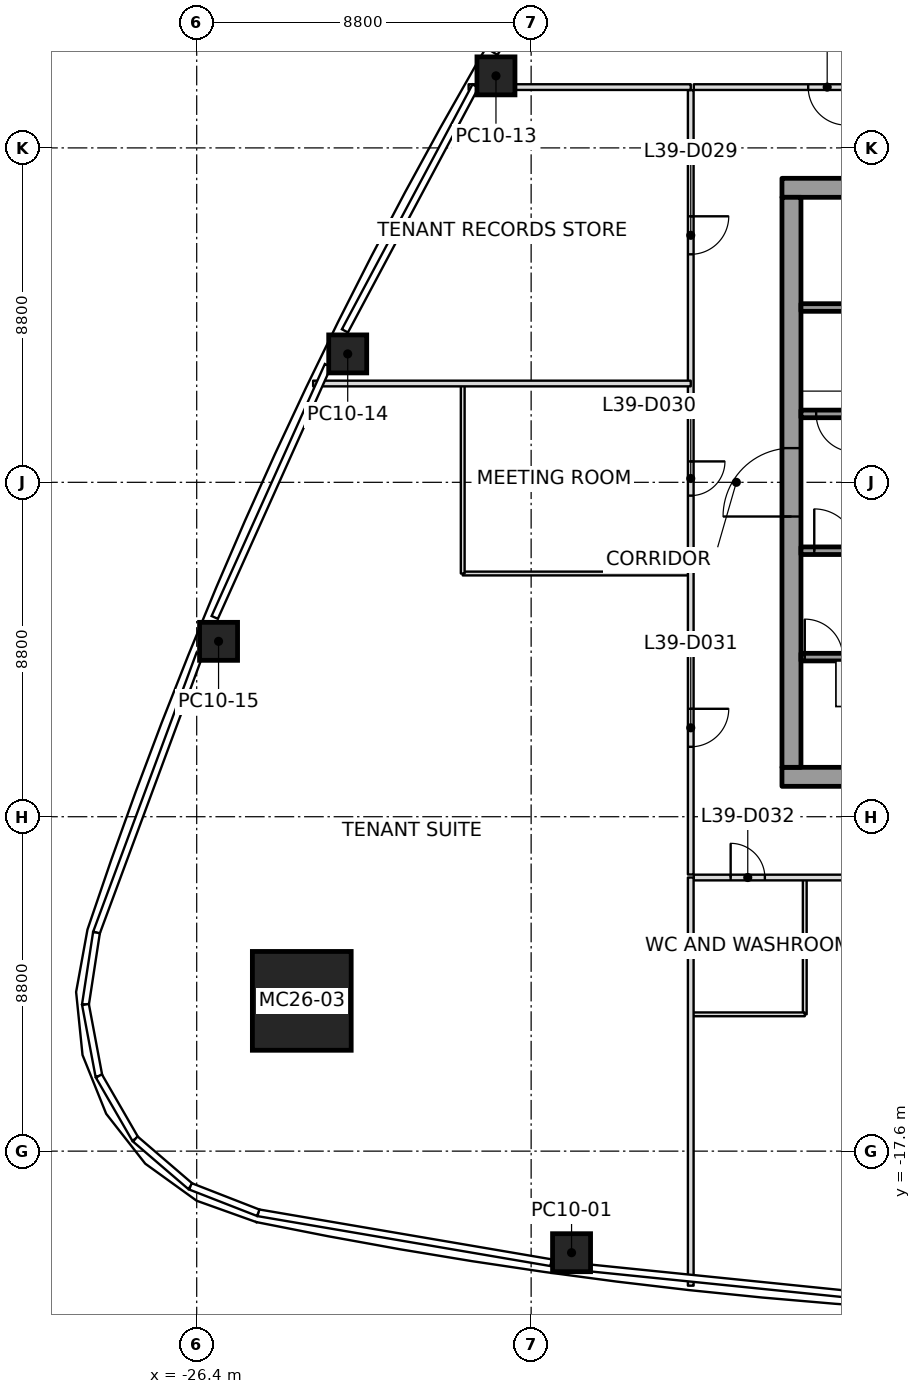
"""IFC4 building model, lengths in metres.
Left out: names, types, materials, properties, quantities, classifications, styles, units other than length and angle.
Written with IfcOpenShell. Run it as: python <this file> out.ifc"""

import sys

from ifc_helpers import new_model, si_unit, direction, frame, frame_2d, origin, origin_2d, place, context, subcontext, project, spatial, rectangle, extrude, element, fill, save


model = new_model("IFC4")
c1 = context("Model", 3, precision=1e-05, world=origin(), true_north=direction((0.0, 1.0)))
c2 = subcontext(c1, "Body", "Model", "MODEL_VIEW")
j1 = project(units=[si_unit("LENGTHUNIT", "METRE"), si_unit("PLANEANGLEUNIT", "RADIAN")], contexts=[c1])
p1 = place(None, origin())
s1 = spatial("IfcSite", under=j1, at=p1, CompositionType="ELEMENT")
p2 = place(p1, origin())
s2 = spatial("IfcBuilding", under=s1, at=p2, CompositionType="ELEMENT")
p3 = place(p2, frame((0.0, 0.0, 177.8)))
s3 = spatial("IfcBuildingStorey", under=s2, at=p3, CompositionType="ELEMENT", Elevation=177.8)
p4 = place(p3, frame((-23.635, -13.646, 0.0), z_axis=(0.028000489904, 0.016165860184, 0.999477182096), x_axis=(0.999607909415, -0.000452829555, -0.027996828039)))
e1 = element("IfcColumn", 1, at=p4, inside=s3, PredefinedType="COLUMN", context=c2, shape_type="SweptSolid", body=[
    extrude(rectangle(XDim=2.6, YDim=2.6, at=origin_2d()), origin(), (0.0, 0.0, 1.0), 4.002),
])
p5 = place(p3, frame((-16.536, -20.273, 0.0), z_axis=(0.017635456472, 0.010434820265, 0.999790030557), x_axis=(-0.990735318315, 0.134853029404, 0.016068276304)))
e2 = element("IfcColumn", 2, at=p5, inside=s3, PredefinedType="COLUMN", context=c2, shape_type="SweptSolid", body=[
    extrude(rectangle(XDim=1.0, YDim=1.0, at=origin_2d()), origin(), (0.0, 0.0, 1.0), 4.001),
])
p6 = place(p3, frame((-18.525, 10.696, 0.0), z_axis=(0.009887049298, -0.00573692984, 0.999934664812), x_axis=(0.499975560967, 0.866039512843, 2.5126546e-05)))
e3 = element("IfcColumn", 3, at=p6, inside=s3, PredefinedType="COLUMN", context=c2, shape_type="SweptSolid", body=[
    extrude(rectangle(XDim=1.0, YDim=1.0, at=origin_2d()), origin(), (0.0, 0.0, 1.0), 4.0),
])
p7 = place(p3, frame((-22.427, 3.379, 0.0), z_axis=(0.014097689605, 0.002074984617, 0.999898469639), x_axis=(0.440365548951, 0.897782283565, -0.008071840787)))
e4 = element("IfcColumn", 4, at=p7, inside=s3, PredefinedType="COLUMN", context=c2, shape_type="SweptSolid", body=[
    extrude(rectangle(XDim=1.0, YDim=1.0, at=origin_2d()), origin(), (0.0, 0.0, 1.0), 4.0),
])
p8 = place(p3, frame((-25.825, -4.185, 0.0), z_axis=(0.017879535448, 0.010068680372, 0.999789449778), x_axis=(0.378749595441, 0.925359269991, -0.016092401795)))
e5 = element("IfcColumn", 5, at=p8, inside=s3, PredefinedType="COLUMN", context=c2, shape_type="SweptSolid", body=[
    extrude(rectangle(XDim=1.0, YDim=1.0, at=origin_2d()), origin(), (0.0, 0.0, 1.0), 4.001),
])
p9 = place(p3, frame((-11.0, -7.75, 0.0), z_axis=(0.0, 0.0, 1.0), x_axis=(1.0, 0.0, 0.0)))
e6 = element("IfcWall", 6, at=p9, inside=s3, PredefinedType="SHEAR", context=c2, shape_type="SweptSolid", body=[
    extrude(rectangle(XDim=22.0, YDim=0.5, at=frame_2d((11.0, 0.0))), origin(), (0.0, 0.0, 1.0), 4.0),
])
p10 = place(p9, frame((10.45, 0.0, 0.0)))
e7 = element("IfcOpeningElement", 7, at=p10, cuts=e6, PredefinedType="OPENING", context=c2, shape_type="SweptSolid", body=[
    extrude(rectangle(XDim=1.1, YDim=2.1, at=frame_2d((0.55, 1.05))), frame((0.0, 0.25, 0.0), z_axis=(0.0, -1.0, 0.0), x_axis=(1.0, 0.0, 0.0)), (0.0, 0.0, 1.0), 0.5),
])
p11 = place(p3, frame((-11.0, 7.75, 0.0), z_axis=(0.0, 0.0, 1.0), x_axis=(1.0, 0.0, 0.0)))
e8 = element("IfcWall", 8, at=p11, inside=s3, PredefinedType="SHEAR", context=c2, shape_type="SweptSolid", body=[
    extrude(rectangle(XDim=22.0, YDim=0.5, at=frame_2d((11.0, 0.0))), origin(), (0.0, 0.0, 1.0), 4.0),
])
p12 = place(p11, frame((10.45, 0.0, 0.0)))
e9 = element("IfcOpeningElement", 9, at=p12, cuts=e8, PredefinedType="OPENING", context=c2, shape_type="SweptSolid", body=[
    extrude(rectangle(XDim=1.1, YDim=2.1, at=frame_2d((0.55, 1.05))), frame((0.0, 0.25, 0.0), z_axis=(0.0, -1.0, 0.0), x_axis=(1.0, 0.0, 0.0)), (0.0, 0.0, 1.0), 0.5),
])
p13 = place(p3, frame((-10.75, -7.5, 0.0), z_axis=(0.0, 0.0, 1.0), x_axis=(0.0, 1.0, 0.0)))
e10 = element("IfcWall", 10, at=p13, inside=s3, PredefinedType="SHEAR", context=c2, shape_type="SweptSolid", body=[
    extrude(rectangle(XDim=15.0, YDim=0.5, at=frame_2d((7.5, 0.0))), origin(), (0.0, 0.0, 1.0), 4.0),
])
p14 = place(p13, frame((6.6, 0.0, 0.0)))
e11 = element("IfcOpeningElement", 11, at=p14, cuts=e10, PredefinedType="OPENING", context=c2, shape_type="SweptSolid", body=[
    extrude(rectangle(XDim=1.8, YDim=2.1, at=frame_2d((0.9, 1.05))), frame((0.0, 0.25, 0.0), z_axis=(0.0, -1.0, 0.0), x_axis=(1.0, 0.0, 0.0)), (0.0, 0.0, 1.0), 0.5),
])
p15 = place(p3, frame((-10.5, -4.6, 0.0), z_axis=(0.0, 0.0, 1.0), x_axis=(1.0, 0.0, 0.0)))
e12 = element("IfcWall", 12, at=p15, inside=s3, PredefinedType="SOLIDWALL", context=c2, shape_type="SweptSolid", body=[
    extrude(rectangle(XDim=1.8, YDim=0.2, at=frame_2d((0.9, 0.0))), origin(), (0.0, 0.0, 1.0), 3.85),
])
p16 = place(p15, frame((0.1, 0.0, 0.0)))
e13 = element("IfcOpeningElement", 13, at=p16, cuts=e12, PredefinedType="OPENING", context=c2, shape_type="SweptSolid", body=[
    extrude(rectangle(XDim=1.0, YDim=2.1, at=frame_2d((0.5, 1.05))), frame((0.0, 0.1, 0.0), z_axis=(0.0, -1.0, 0.0), x_axis=(1.0, 0.0, 0.0)), (0.0, 0.0, 1.0), 0.2),
])
p17 = place(p3, frame((-10.5, -1.8, 0.0), z_axis=(0.0, 0.0, 1.0), x_axis=(1.0, 0.0, 0.0)))
e14 = element("IfcWall", 14, at=p17, inside=s3, PredefinedType="SOLIDWALL", context=c2, shape_type="SweptSolid", body=[
    extrude(rectangle(XDim=1.8, YDim=0.2, at=frame_2d((0.9, 0.0))), origin(), (0.0, 0.0, 1.0), 3.85),
])
p18 = place(p17, frame((0.35, 0.0, 0.0)))
e15 = element("IfcOpeningElement", 15, at=p18, cuts=e14, PredefinedType="OPENING", context=c2, shape_type="SweptSolid", body=[
    extrude(rectangle(XDim=1.1, YDim=2.1, at=frame_2d((0.55, 1.05))), frame((0.0, 0.1, 0.0), z_axis=(0.0, -1.0, 0.0), x_axis=(1.0, 0.0, 0.0)), (0.0, 0.0, 1.0), 0.2),
])
p19 = place(p3, frame((-8.7, 1.8, 0.0), z_axis=(0.0, 0.0, 1.0), x_axis=(-1.0, 0.0, 0.0)))
e16 = element("IfcWall", 16, at=p19, inside=s3, PredefinedType="SOLIDWALL", context=c2, shape_type="SweptSolid", body=[
    extrude(rectangle(XDim=1.8, YDim=0.2, at=frame_2d((0.9, 0.0))), origin(), (0.0, 0.0, 1.0), 3.85),
])
p20 = place(p19, frame((0.4, 0.0, 0.0)))
e17 = element("IfcOpeningElement", 17, at=p20, cuts=e16, PredefinedType="OPENING", context=c2, shape_type="SweptSolid", body=[
    extrude(rectangle(XDim=1.0, YDim=2.1, at=frame_2d((0.5, 1.05))), frame((0.0, 0.1, 0.0), z_axis=(0.0, -1.0, 0.0), x_axis=(1.0, 0.0, 0.0)), (0.0, 0.0, 1.0), 0.2),
])
p21 = place(p3, frame((-8.7, 4.6, 0.0), z_axis=(0.0, 0.0, 1.0), x_axis=(-1.0, 0.0, 0.0)))
e18 = element("IfcWall", 18, at=p21, inside=s3, PredefinedType="SOLIDWALL", context=c2, shape_type="SweptSolid", body=[
    extrude(rectangle(XDim=1.8, YDim=0.2, at=frame_2d((0.9, 0.0))), origin(), (0.0, 0.0, 1.0), 3.85),
])
p22 = place(p3, frame((-13.4, 2.6, 0.0), z_axis=(0.0, 0.0, 1.0), x_axis=(-1.0, 0.0, 0.0)))
e19 = element("IfcWall", 19, at=p22, inside=s3, PredefinedType="PARTITIONING", context=c2, shape_type="SweptSolid", body=[
    extrude(rectangle(XDim=9.937, YDim=0.15, at=frame_2d((4.968, 0.0))), origin(), (0.0, 0.0, 1.0), 3.234),
])
p23 = place(p3, frame((-13.4, 10.4, 0.0), z_axis=(0.0, 0.0, 1.0), x_axis=(-1.0, 0.0, 0.0)))
e20 = element("IfcWall", 20, at=p23, inside=s3, PredefinedType="PARTITIONING", context=c2, shape_type="SweptSolid", body=[
    extrude(rectangle(XDim=5.845, YDim=0.15, at=frame_2d((2.923, 0.0))), origin(), (0.0, 0.0, 1.0), 3.234),
])
p24 = place(p3, frame((-13.4, -10.4, 0.0), z_axis=(0.0, 0.0, 1.0), x_axis=(0.0, -1.0, 0.0)))
e21 = element("IfcWall", 21, at=p24, inside=s3, PredefinedType="PARTITIONING", context=c2, shape_type="SweptSolid", body=[
    extrude(rectangle(XDim=10.741, YDim=0.15, at=frame_2d((5.37, 0.0))), origin(), (0.0, 0.0, 1.0), 3.234),
])
p25 = place(p3, frame((-13.4, 10.32, 0.0), z_axis=(0.0, 0.0, 1.0), x_axis=(0.0, -1.0, 0.0)))
e22 = element("IfcWall", 22, at=p25, inside=s3, PredefinedType="PARTITIONING", context=c2, shape_type="SweptSolid", body=[
    extrude(rectangle(XDim=20.64, YDim=0.15, at=frame_2d((10.32, 0.0))), origin(), (0.0, 0.0, 1.0), 3.166),
])
p26 = place(p25, frame((3.32, 0.0, 0.0)))
e23 = element("IfcOpeningElement", 23, at=p26, cuts=e22, PredefinedType="OPENING", context=c2, shape_type="SweptSolid", body=[
    extrude(rectangle(XDim=1.0, YDim=2.1, at=frame_2d((0.5, 1.05))), frame((0.0, 0.075, 0.0), z_axis=(0.0, -1.0, 0.0), x_axis=(1.0, 0.0, 0.0)), (0.0, 0.0, 1.0), 0.15),
])
p27 = place(p25, frame((9.77, 0.0, 0.0)))
e24 = element("IfcOpeningElement", 24, at=p27, cuts=e22, PredefinedType="OPENING", context=c2, shape_type="SweptSolid", body=[
    extrude(rectangle(XDim=0.9, YDim=2.1, at=frame_2d((0.45, 1.05))), frame((0.0, 0.075, 0.0), z_axis=(0.0, -1.0, 0.0), x_axis=(1.0, 0.0, 0.0)), (0.0, 0.0, 1.0), 0.15),
])
p28 = place(p25, frame((16.28, 0.0, 0.0)))
e25 = element("IfcOpeningElement", 25, at=p28, cuts=e22, PredefinedType="OPENING", context=c2, shape_type="SweptSolid", body=[
    extrude(rectangle(XDim=1.0, YDim=2.1, at=frame_2d((0.5, 1.05))), frame((0.0, 0.075, 0.0), z_axis=(0.0, -1.0, 0.0), x_axis=(1.0, 0.0, 0.0)), (0.0, 0.0, 1.0), 0.15),
])
p29 = place(p3, frame((-13.32, -10.4, 0.0), z_axis=(0.0, 0.0, 1.0), x_axis=(1.0, 0.0, 0.0)))
e26 = element("IfcWall", 26, at=p29, inside=s3, PredefinedType="PARTITIONING", context=c2, shape_type="SweptSolid", body=[
    extrude(rectangle(XDim=26.64, YDim=0.15, at=frame_2d((13.32, 0.0))), origin(), (0.0, 0.0, 1.0), 3.317),
])
p30 = place(p29, frame((0.97, 0.0, 0.0)))
e27 = element("IfcOpeningElement", 27, at=p30, cuts=e26, PredefinedType="OPENING", context=c2, shape_type="SweptSolid", body=[
    extrude(rectangle(XDim=0.9, YDim=2.1, at=frame_2d((0.45, 1.05))), frame((0.0, 0.075, 0.0), z_axis=(0.0, -1.0, 0.0), x_axis=(1.0, 0.0, 0.0)), (0.0, 0.0, 1.0), 0.15),
])
p31 = place(p29, frame((8.62, 0.0, 0.0)))
e28 = element("IfcOpeningElement", 28, at=p31, cuts=e26, PredefinedType="OPENING", context=c2, shape_type="SweptSolid", body=[
    extrude(rectangle(XDim=1.0, YDim=2.1, at=frame_2d((0.5, 1.05))), frame((0.0, 0.075, 0.0), z_axis=(0.0, -1.0, 0.0), x_axis=(1.0, 0.0, 0.0)), (0.0, 0.0, 1.0), 0.15),
])
p32 = place(p29, frame((16.27, 0.0, 0.0)))
e29 = element("IfcOpeningElement", 29, at=p32, cuts=e26, PredefinedType="OPENING", context=c2, shape_type="SweptSolid", body=[
    extrude(rectangle(XDim=0.9, YDim=2.1, at=frame_2d((0.45, 1.05))), frame((0.0, 0.075, 0.0), z_axis=(0.0, -1.0, 0.0), x_axis=(1.0, 0.0, 0.0)), (0.0, 0.0, 1.0), 0.15),
])
p33 = place(p29, frame((22.02, 0.0, 0.0)))
e30 = element("IfcOpeningElement", 30, at=p33, cuts=e26, PredefinedType="OPENING", context=c2, shape_type="SweptSolid", body=[
    extrude(rectangle(XDim=1.0, YDim=2.1, at=frame_2d((0.5, 1.05))), frame((0.0, 0.075, 0.0), z_axis=(0.0, -1.0, 0.0), x_axis=(1.0, 0.0, 0.0)), (0.0, 0.0, 1.0), 0.15),
])
p34 = place(p3, frame((13.32, 10.4, 0.0), z_axis=(0.0, 0.0, 1.0), x_axis=(-1.0, 0.0, 0.0)))
e31 = element("IfcWall", 31, at=p34, inside=s3, PredefinedType="PARTITIONING", context=c2, shape_type="SweptSolid", body=[
    extrude(rectangle(XDim=26.64, YDim=0.15, at=frame_2d((13.32, 0.0))), origin(), (0.0, 0.0, 1.0), 3.166),
])
p35 = place(p34, frame((1.95, 0.0, 0.0)))
e32 = element("IfcOpeningElement", 32, at=p35, cuts=e31, PredefinedType="OPENING", context=c2, shape_type="SweptSolid", body=[
    extrude(rectangle(XDim=0.9, YDim=2.1, at=frame_2d((0.45, 1.05))), frame((0.0, 0.075, 0.0), z_axis=(0.0, -1.0, 0.0), x_axis=(1.0, 0.0, 0.0)), (0.0, 0.0, 1.0), 0.15),
])
p36 = place(p34, frame((9.61, 0.0, 0.0)))
e33 = element("IfcOpeningElement", 33, at=p36, cuts=e31, PredefinedType="OPENING", context=c2, shape_type="SweptSolid", body=[
    extrude(rectangle(XDim=1.0, YDim=2.1, at=frame_2d((0.5, 1.05))), frame((0.0, 0.075, 0.0), z_axis=(0.0, -1.0, 0.0), x_axis=(1.0, 0.0, 0.0)), (0.0, 0.0, 1.0), 0.15),
])
p37 = place(p34, frame((16.87, 0.0, 0.0)))
e34 = element("IfcOpeningElement", 34, at=p37, cuts=e31, PredefinedType="OPENING", context=c2, shape_type="SweptSolid", body=[
    extrude(rectangle(XDim=0.9, YDim=2.1, at=frame_2d((0.45, 1.05))), frame((0.0, 0.075, 0.0), z_axis=(0.0, -1.0, 0.0), x_axis=(1.0, 0.0, 0.0)), (0.0, 0.0, 1.0), 0.15),
])
p38 = place(p34, frame((22.63, 0.0, 0.0)))
e35 = element("IfcOpeningElement", 35, at=p38, cuts=e31, PredefinedType="OPENING", context=c2, shape_type="SweptSolid", body=[
    extrude(rectangle(XDim=1.0, YDim=2.1, at=frame_2d((0.5, 1.05))), frame((0.0, 0.075, 0.0), z_axis=(0.0, -1.0, 0.0), x_axis=(1.0, 0.0, 0.0)), (0.0, 0.0, 1.0), 0.15),
])
p39 = place(p3, frame((-13.43, -2.4, 0.0), z_axis=(0.0, 0.0, 1.0), x_axis=(-1.0, 0.0, 0.0)))
e36 = element("IfcWall", 36, at=p39, inside=s3, PredefinedType="PARTITIONING", context=c2, shape_type="SweptSolid", body=[
    extrude(rectangle(XDim=5.97, YDim=0.1, at=frame_2d((2.985, 0.0))), origin(), (0.0, 0.0, 1.0), 3.317),
])
p40 = place(p3, frame((-19.4, -2.4, 0.0), z_axis=(0.0, 0.0, 1.0), x_axis=(0.0, 1.0, 0.0)))
e37 = element("IfcWall", 37, at=p40, inside=s3, PredefinedType="PARTITIONING", context=c2, shape_type="SweptSolid", body=[
    extrude(rectangle(XDim=4.97, YDim=0.1, at=frame_2d((2.485, 0.0))), origin(), (0.0, 0.0, 1.0), 3.317),
])
p41 = place(p3, frame((-10.4, -10.43, 0.0), z_axis=(0.0, 0.0, 1.0), x_axis=(0.0, -1.0, 0.0)))
e38 = element("IfcWall", 38, at=p41, inside=s3, PredefinedType="PARTITIONING", context=c2, shape_type="SweptSolid", body=[
    extrude(rectangle(XDim=3.57, YDim=0.1, at=frame_2d((1.785, 0.0))), origin(), (0.0, 0.0, 1.0), 3.45),
])
p42 = place(p3, frame((-10.4, -14.0, 0.0), z_axis=(0.0, 0.0, 1.0), x_axis=(-1.0, 0.0, 0.0)))
e39 = element("IfcWall", 39, at=p42, inside=s3, PredefinedType="PARTITIONING", context=c2, shape_type="SweptSolid", body=[
    extrude(rectangle(XDim=2.97, YDim=0.1, at=frame_2d((1.485, 0.0))), origin(), (0.0, 0.0, 1.0), 3.393),
])
p43 = place(p38, origin())
e40 = element("IfcDoor", 40, at=p43, inside=s3, OperationType="SINGLE_SWING_LEFT", PredefinedType="DOOR", context=c2, shape_type="SweptSolid", body=[
    extrude(rectangle(XDim=1.0, YDim=2.1, at=frame_2d((0.5, 1.05))), frame((0.0, 0.025, 0.0), z_axis=(0.0, -1.0, 0.0), x_axis=(1.0, 0.0, 0.0)), (0.0, 0.0, 1.0), 0.05),
])
fill(e35, e40)
p44 = place(p26, origin())
e41 = element("IfcDoor", 41, at=p44, inside=s3, OperationType="SINGLE_SWING_LEFT", PredefinedType="DOOR", context=c2, shape_type="SweptSolid", body=[
    extrude(rectangle(XDim=1.0, YDim=2.1, at=frame_2d((0.5, 1.05))), frame((0.0, 0.025, 0.0), z_axis=(0.0, -1.0, 0.0), x_axis=(1.0, 0.0, 0.0)), (0.0, 0.0, 1.0), 0.05),
])
fill(e23, e41)
p45 = place(p27, origin())
e42 = element("IfcDoor", 42, at=p45, inside=s3, OperationType="SINGLE_SWING_RIGHT", PredefinedType="DOOR", context=c2, shape_type="SweptSolid", body=[
    extrude(rectangle(XDim=0.9, YDim=2.1, at=frame_2d((0.45, 1.05))), frame((0.0, 0.025, 0.0), z_axis=(0.0, -1.0, 0.0), x_axis=(1.0, 0.0, 0.0)), (0.0, 0.0, 1.0), 0.05),
])
fill(e24, e42)
p46 = place(p28, origin())
e43 = element("IfcDoor", 43, at=p46, inside=s3, OperationType="SINGLE_SWING_RIGHT", PredefinedType="DOOR", context=c2, shape_type="SweptSolid", body=[
    extrude(rectangle(XDim=1.0, YDim=2.1, at=frame_2d((0.5, 1.05))), frame((0.0, 0.025, 0.0), z_axis=(0.0, -1.0, 0.0), x_axis=(1.0, 0.0, 0.0)), (0.0, 0.0, 1.0), 0.05),
])
fill(e25, e43)
p47 = place(p30, origin())
e44 = element("IfcDoor", 44, at=p47, inside=s3, OperationType="SINGLE_SWING_RIGHT", PredefinedType="DOOR", context=c2, shape_type="SweptSolid", body=[
    extrude(rectangle(XDim=0.9, YDim=2.1, at=frame_2d((0.45, 1.05))), frame((0.0, 0.025, 0.0), z_axis=(0.0, -1.0, 0.0), x_axis=(1.0, 0.0, 0.0)), (0.0, 0.0, 1.0), 0.05),
])
fill(e27, e44)
p48 = place(p18, origin())
e45 = element("IfcDoor", 45, at=p48, inside=s3, OperationType="SINGLE_SWING_LEFT", PredefinedType="DOOR", context=c2, shape_type="SweptSolid", body=[
    extrude(rectangle(XDim=1.1, YDim=2.1, at=frame_2d((0.55, 1.05))), frame((0.0, 0.025, 0.0), z_axis=(0.0, -1.0, 0.0), x_axis=(1.0, 0.0, 0.0)), (0.0, 0.0, 1.0), 0.05),
])
fill(e15, e45)
p49 = place(p20, origin())
e46 = element("IfcDoor", 46, at=p49, inside=s3, OperationType="SINGLE_SWING_LEFT", PredefinedType="DOOR", context=c2, shape_type="SweptSolid", body=[
    extrude(rectangle(XDim=1.0, YDim=2.1, at=frame_2d((0.5, 1.05))), frame((0.0, 0.025, 0.0), z_axis=(0.0, -1.0, 0.0), x_axis=(1.0, 0.0, 0.0)), (0.0, 0.0, 1.0), 0.05),
])
fill(e17, e46)
p50 = place(p16, origin())
e47 = element("IfcDoor", 47, at=p50, inside=s3, OperationType="SINGLE_SWING_LEFT", PredefinedType="DOOR", context=c2, shape_type="SweptSolid", body=[
    extrude(rectangle(XDim=1.0, YDim=2.1, at=frame_2d((0.5, 1.05))), frame((0.0, 0.025, 0.0), z_axis=(0.0, -1.0, 0.0), x_axis=(1.0, 0.0, 0.0)), (0.0, 0.0, 1.0), 0.05),
])
fill(e13, e47)
p51 = place(p14, origin())
e48 = element("IfcDoor", 48, at=p51, inside=s3, OperationType="DOUBLE_DOOR_SINGLE_SWING", PredefinedType="DOOR", context=c2, shape_type="SweptSolid", body=[
    extrude(rectangle(XDim=1.8, YDim=2.1, at=frame_2d((0.9, 1.05))), frame((0.0, 0.025, 0.0), z_axis=(0.0, -1.0, 0.0), x_axis=(1.0, 0.0, 0.0)), (0.0, 0.0, 1.0), 0.05),
])
fill(e11, e48)
save(model, sys.argv[1])
